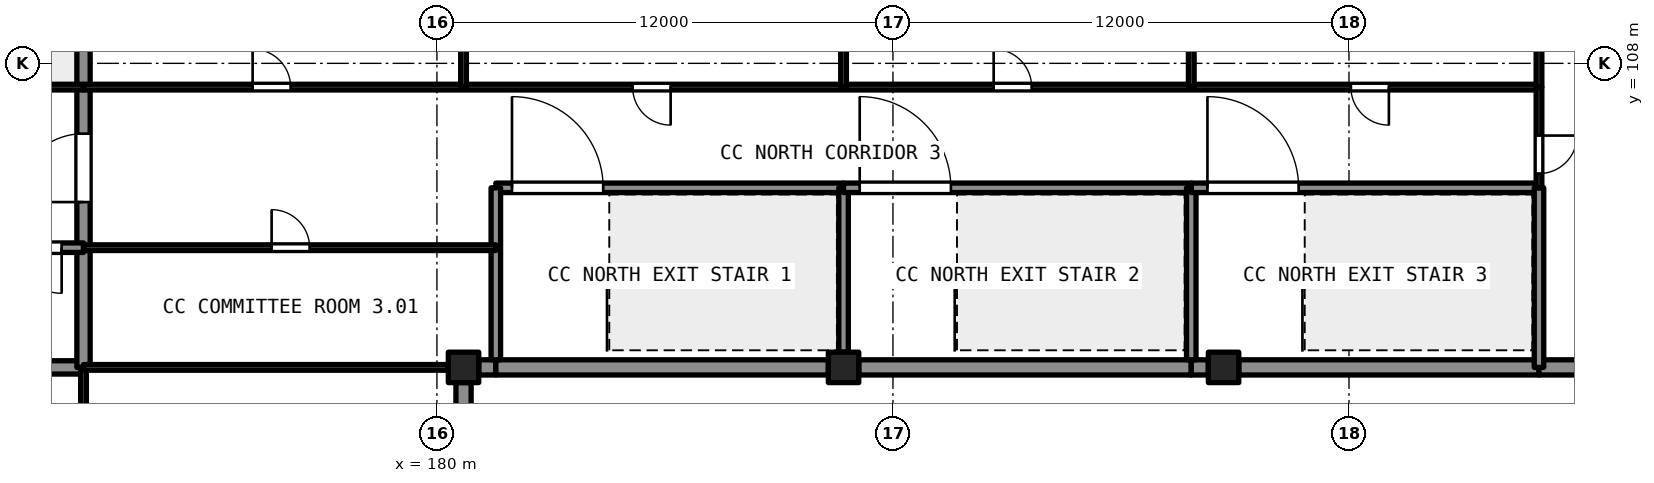
"""IFC4 building model, lengths in metres.
Left out: names, types, materials, properties, quantities, classifications, styles, units other than length and angle.
Written with IfcOpenShell. Run it as: python <this file> out.ifc"""

import sys

from ifc_helpers import new_model, si_unit, direction, frame, frame_2d, origin, origin_2d, place, context, subcontext, project, spatial, rectangle, extrude, element, fill, save


model = new_model("IFC4")
c1 = context("Model", 3, precision=1e-05, world=origin(), true_north=direction((0.0, 1.0)))
c2 = subcontext(c1, "Body", "Model", "MODEL_VIEW")
j1 = project(units=[si_unit("LENGTHUNIT", "METRE"), si_unit("PLANEANGLEUNIT", "RADIAN")], contexts=[c1])
p1 = place(None, origin())
s1 = spatial("IfcSite", under=j1, at=p1, CompositionType="ELEMENT")
p2 = place(p1, origin())
s2 = spatial("IfcBuilding", under=s1, at=p2, CompositionType="ELEMENT")
p3 = place(p2, frame((0.0, 0.0, 20.4)))
s3 = spatial("IfcBuildingStorey", under=s2, at=p3, CompositionType="ELEMENT", Elevation=20.4)
for number, where, z_axis, x_axis in (
    (1, (180.7, 100.0, 0.0), (0.0, 0.0, 1.0), (1.0, 0.0, 0.0)),
    (2, (190.7, 100.0, 0.0), (0.0, 0.0, 1.0), (1.0, 0.0, 0.0)),
    (3, (200.7, 100.0, 0.0), (0.0, 0.0, 1.0), (1.0, 0.0, 0.0)),
):
    element("IfcColumn", number, at=place(p3, frame(where, z_axis=z_axis, x_axis=x_axis)), inside=s3, PredefinedType="COLUMN", context=c2, shape_type="SweptSolid", body=[
        extrude(rectangle(XDim=0.8, YDim=0.8, at=origin_2d()), origin(), (0.0, 0.0, 1.0), 4.59),
    ])
p4 = place(p3, frame((180.7, 60.4, 0.0), z_axis=(0.0, 0.0, 1.0), x_axis=(0.0, 1.0, 0.0)))
e4 = element("IfcWall", 4, at=p4, inside=s3, PredefinedType="SHEAR", context=c2, shape_type="SweptSolid", body=[
    extrude(rectangle(XDim=39.2, YDim=0.4, at=frame_2d((19.6, 0.0))), origin(), (0.0, 0.0, 1.0), 4.59),
])
p5 = place(p3, frame((181.1, 100.0, 0.0), z_axis=(0.0, 0.0, 1.0), x_axis=(1.0, 0.0, 0.0)))
e5 = element("IfcWall", 5, at=p5, inside=s3, PredefinedType="SHEAR", context=c2, shape_type="SweptSolid", body=[
    extrude(rectangle(XDim=0.45, YDim=0.4, at=frame_2d((0.225, 0.0))), origin(), (0.0, 0.0, 1.0), 4.59),
])
for number, where, z_axis, x_axis in (
    (6, (181.55, 100.0, 0.0), (0.0, 0.0, 1.0), (1.0, 0.0, 0.0)),
    (7, (191.1, 100.0, 0.0), (0.0, 0.0, 1.0), (1.0, 0.0, 0.0)),
):
    element("IfcWall", number, at=place(p3, frame(where, z_axis=z_axis, x_axis=x_axis)), inside=s3, PredefinedType="SHEAR", context=c2, shape_type="SweptSolid", body=[
        extrude(rectangle(XDim=8.75, YDim=0.4, at=frame_2d((4.375, 0.0))), origin(), (0.0, 0.0, 1.0), 4.59),
    ])
p6 = place(p3, frame((199.85, 100.0, 0.0), z_axis=(0.0, 0.0, 1.0), x_axis=(1.0, 0.0, 0.0)))
e8 = element("IfcWall", 8, at=p6, inside=s3, PredefinedType="SHEAR", context=c2, shape_type="SweptSolid", body=[
    extrude(rectangle(XDim=0.45, YDim=0.4, at=frame_2d((0.225, 0.0))), origin(), (0.0, 0.0, 1.0), 4.59),
])
p7 = place(p3, frame((201.1, 100.0, 0.0), z_axis=(0.0, 0.0, 1.0), x_axis=(1.0, 0.0, 0.0)))
e9 = element("IfcWall", 9, at=p7, inside=s3, PredefinedType="SHEAR", context=c2, shape_type="SweptSolid", body=[
    extrude(rectangle(XDim=7.9, YDim=0.4, at=frame_2d((3.95, 0.0))), origin(), (0.0, 0.0, 1.0), 4.59),
])
p8 = place(p3, frame((209.0, 100.0, 0.0), z_axis=(0.0, 0.0, 1.0), x_axis=(1.0, 0.0, 0.0)))
e10 = element("IfcWall", 10, at=p8, inside=s3, PredefinedType="SHEAR", context=c2, shape_type="SweptSolid", body=[
    extrude(rectangle(XDim=1.3, YDim=0.4, at=frame_2d((0.65, 0.0))), origin(), (0.0, 0.0, 1.0), 4.59),
])
p9 = place(p3, frame((163.0, 100.0, 0.0), z_axis=(0.0, 0.0, 1.0), x_axis=(1.0, 0.0, 0.0)))
e11 = element("IfcWall", 11, at=p9, inside=s3, PredefinedType="SHEAR", context=c2, shape_type="SweptSolid", body=[
    extrude(rectangle(XDim=7.7, YDim=0.35, at=frame_2d((3.85, 0.0))), origin(), (0.0, 0.0, 1.0), 4.59),
])
p10 = place(p3, frame((170.7, 100.0, 0.0), z_axis=(0.0, 0.0, 1.0), x_axis=(0.0, 1.0, 0.0)))
e12 = element("IfcWall", 12, at=p10, inside=s3, PredefinedType="SHEAR", context=c2, shape_type="SweptSolid", body=[
    extrude(rectangle(XDim=3.15, YDim=0.35, at=frame_2d((1.575, 0.0))), origin(), (0.0, 0.0, 1.0), 4.59),
])
p11 = place(p3, frame((170.7, 103.15, 0.0), z_axis=(0.0, 0.0, 1.0), x_axis=(0.0, 1.0, 0.0)))
e13 = element("IfcWall", 13, at=p11, inside=s3, PredefinedType="SHEAR", context=c2, shape_type="SweptSolid", body=[
    extrude(rectangle(XDim=7.25, YDim=0.35, at=frame_2d((3.625, 0.0))), origin(), (0.0, 0.0, 1.0), 4.59),
])
p12 = place(p11, frame((1.2, 0.0, 0.0)))
e14 = element("IfcOpeningElement", 14, at=p12, cuts=e13, PredefinedType="OPENING", context=c2, shape_type="SweptSolid", body=[
    extrude(rectangle(XDim=1.8, YDim=2.1, at=frame_2d((0.9, 1.05))), frame((0.0, 0.186, 0.0), z_axis=(0.0, -1.0, 0.0), x_axis=(1.0, 0.0, 0.0)), (0.0, 0.0, 1.0), 0.371),
])
p13 = place(p3, frame((163.0, 103.15, 0.0), z_axis=(0.0, 0.0, 1.0), x_axis=(1.0, 0.0, 0.0)))
e15 = element("IfcWall", 15, at=p13, inside=s3, PredefinedType="SHEAR", context=c2, shape_type="SweptSolid", body=[
    extrude(rectangle(XDim=7.7, YDim=0.25, at=frame_2d((3.85, 0.0))), origin(), (0.0, 0.0, 1.0), 4.59),
])
p14 = place(p13, frame((5.925, 0.0, 0.0)))
e16 = element("IfcOpeningElement", 16, at=p14, cuts=e15, PredefinedType="OPENING", context=c2, shape_type="SweptSolid", body=[
    extrude(rectangle(XDim=1.2, YDim=2.1, at=frame_2d((0.6, 1.05))), frame((0.0, 0.135, 0.0), z_axis=(0.0, -1.0, 0.0), x_axis=(1.0, 0.0, 0.0)), (0.0, 0.0, 1.0), 0.271),
])
p15 = place(p3, frame((163.875, 107.375, 0.0), z_axis=(0.0, 0.0, 1.0), x_axis=(1.0, 0.0, 0.0)))
e17 = element("IfcWall", 17, at=p15, inside=s3, PredefinedType="PARTITIONING", context=c2, shape_type="SweptSolid", body=[
    extrude(rectangle(XDim=6.825, YDim=0.15, at=frame_2d((3.413, 0.0))), origin(), (0.0, 0.0, 1.0), 4.59),
])
p16 = place(p15, frame((2.95, 0.0, 0.0)))
e18 = element("IfcOpeningElement", 18, at=p16, cuts=e17, PredefinedType="OPENING", context=c2, shape_type="SweptSolid", body=[
    extrude(rectangle(XDim=0.9, YDim=2.1, at=frame_2d((0.45, 1.05))), frame((0.0, 0.085, 0.0), z_axis=(0.0, -1.0, 0.0), x_axis=(1.0, 0.0, 0.0)), (0.0, 0.0, 1.0), 0.171),
])
p17 = place(p3, frame((170.7, 90.0, 0.0), z_axis=(0.0, 0.0, 1.0), x_axis=(0.0, 1.0, 0.0)))
e19 = element("IfcWall", 19, at=p17, inside=s3, PredefinedType="PARTITIONING", context=c2, shape_type="SweptSolid", body=[
    extrude(rectangle(XDim=10.0, YDim=0.15, at=frame_2d((5.0, 0.0))), origin(), (0.0, 0.0, 1.0), 4.59),
])
p18 = place(p3, frame((170.7, 100.0, 0.0), z_axis=(0.0, 0.0, 1.0), x_axis=(1.0, 0.0, 0.0)))
e20 = element("IfcWall", 20, at=p18, inside=s3, PredefinedType="PARTITIONING", context=c2, shape_type="SweptSolid", body=[
    extrude(rectangle(XDim=9.6, YDim=0.15, at=frame_2d((4.8, 0.0))), origin(), (0.0, 0.0, 1.0), 4.59),
])
p19 = place(p3, frame((181.55, 104.725, 0.0), z_axis=(0.0, 0.0, 1.0), x_axis=(1.0, 0.0, 0.0)))
e21 = element("IfcWall", 21, at=p19, inside=s3, PredefinedType="SHEAR", context=c2, shape_type="SweptSolid", body=[
    extrude(rectangle(XDim=9.15, YDim=0.25, at=frame_2d((4.575, 0.0))), origin(), (0.0, 0.0, 1.0), 4.59),
])
p20 = place(p19, frame((0.425, 0.0, 0.0)))
e22 = element("IfcOpeningElement", 22, at=p20, cuts=e21, PredefinedType="OPENING", context=c2, shape_type="SweptSolid", body=[
    extrude(rectangle(XDim=2.4, YDim=2.1, at=frame_2d((1.2, 1.05))), frame((0.0, 0.135, 0.0), z_axis=(0.0, -1.0, 0.0), x_axis=(1.0, 0.0, 0.0)), (0.0, 0.0, 1.0), 0.271),
])
p21 = place(p3, frame((181.55, 100.2, 0.0), z_axis=(0.0, 0.0, 1.0), x_axis=(0.0, 1.0, 0.0)))
e23 = element("IfcWall", 23, at=p21, inside=s3, PredefinedType="SHEAR", context=c2, shape_type="SweptSolid", body=[
    extrude(rectangle(XDim=4.525, YDim=0.25, at=frame_2d((2.263, 0.0))), origin(), (0.0, 0.0, 1.0), 4.59),
])
p22 = place(p3, frame((190.7, 100.4, 0.0), z_axis=(0.0, 0.0, 1.0), x_axis=(0.0, 1.0, 0.0)))
e24 = element("IfcWall", 24, at=p22, inside=s3, PredefinedType="SHEAR", context=c2, shape_type="SweptSolid", body=[
    extrude(rectangle(XDim=4.325, YDim=0.25, at=frame_2d((2.163, 0.0))), origin(), (0.0, 0.0, 1.0), 4.59),
])
p23 = place(p3, frame((190.7, 104.725, 0.0), z_axis=(0.0, 0.0, 1.0), x_axis=(1.0, 0.0, 0.0)))
e25 = element("IfcWall", 25, at=p23, inside=s3, PredefinedType="SHEAR", context=c2, shape_type="SweptSolid", body=[
    extrude(rectangle(XDim=9.15, YDim=0.25, at=frame_2d((4.575, 0.0))), origin(), (0.0, 0.0, 1.0), 4.59),
])
p24 = place(p23, frame((0.425, 0.0, 0.0)))
e26 = element("IfcOpeningElement", 26, at=p24, cuts=e25, PredefinedType="OPENING", context=c2, shape_type="SweptSolid", body=[
    extrude(rectangle(XDim=2.4, YDim=2.1, at=frame_2d((1.2, 1.05))), frame((0.0, 0.135, 0.0), z_axis=(0.0, -1.0, 0.0), x_axis=(1.0, 0.0, 0.0)), (0.0, 0.0, 1.0), 0.271),
])
p25 = place(p3, frame((199.85, 100.2, 0.0), z_axis=(0.0, 0.0, 1.0), x_axis=(0.0, 1.0, 0.0)))
e27 = element("IfcWall", 27, at=p25, inside=s3, PredefinedType="SHEAR", context=c2, shape_type="SweptSolid", body=[
    extrude(rectangle(XDim=4.525, YDim=0.25, at=frame_2d((2.263, 0.0))), origin(), (0.0, 0.0, 1.0), 4.59),
])
p26 = place(p3, frame((199.85, 104.725, 0.0), z_axis=(0.0, 0.0, 1.0), x_axis=(1.0, 0.0, 0.0)))
e28 = element("IfcWall", 28, at=p26, inside=s3, PredefinedType="SHEAR", context=c2, shape_type="SweptSolid", body=[
    extrude(rectangle(XDim=9.15, YDim=0.25, at=frame_2d((4.575, 0.0))), origin(), (0.0, 0.0, 1.0), 4.59),
])
p27 = place(p26, frame((0.425, 0.0, 0.0)))
e29 = element("IfcOpeningElement", 29, at=p27, cuts=e28, PredefinedType="OPENING", context=c2, shape_type="SweptSolid", body=[
    extrude(rectangle(XDim=2.4, YDim=2.1, at=frame_2d((1.2, 1.05))), frame((0.0, 0.135, 0.0), z_axis=(0.0, -1.0, 0.0), x_axis=(1.0, 0.0, 0.0)), (0.0, 0.0, 1.0), 0.271),
])
p28 = place(p3, frame((209.0, 100.0, 0.0), z_axis=(0.0, 0.0, 1.0), x_axis=(0.0, 1.0, 0.0)))
e30 = element("IfcWall", 30, at=p28, inside=s3, PredefinedType="SHEAR", context=c2, shape_type="SweptSolid", body=[
    extrude(rectangle(XDim=4.725, YDim=0.25, at=frame_2d((2.363, 0.0))), origin(), (0.0, 0.0, 1.0), 4.59),
])
p29 = place(p3, frame((170.7, 103.15, 0.0), z_axis=(0.0, 0.0, 1.0), x_axis=(1.0, 0.0, 0.0)))
e31 = element("IfcWall", 31, at=p29, inside=s3, PredefinedType="PARTITIONING", context=c2, shape_type="SweptSolid", body=[
    extrude(rectangle(XDim=10.85, YDim=0.15, at=frame_2d((5.425, 0.0))), origin(), (0.0, 0.0, 1.0), 4.59),
])
p30 = place(p29, frame((4.95, 0.0, 0.0)))
e32 = element("IfcOpeningElement", 32, at=p30, cuts=e31, PredefinedType="OPENING", context=c2, shape_type="SweptSolid", body=[
    extrude(rectangle(XDim=1.0, YDim=2.1, at=frame_2d((0.5, 1.05))), frame((0.0, 0.085, 0.0), z_axis=(0.0, -1.0, 0.0), x_axis=(1.0, 0.0, 0.0)), (0.0, 0.0, 1.0), 0.171),
])
p31 = place(p3, frame((209.0, 107.375, 0.0), z_axis=(0.0, 0.0, 1.0), x_axis=(-1.0, 0.0, 0.0)))
e33 = element("IfcWall", 33, at=p31, inside=s3, PredefinedType="PARTITIONING", context=c2, shape_type="SweptSolid", body=[
    extrude(rectangle(XDim=38.3, YDim=0.15, at=frame_2d((19.15, 0.0))), origin(), (0.0, 0.0, 1.0), 4.59),
])
p32 = place(p31, frame((32.85, 0.0, 0.0)))
e34 = element("IfcOpeningElement", 34, at=p32, cuts=e33, PredefinedType="OPENING", context=c2, shape_type="SweptSolid", body=[
    extrude(rectangle(XDim=1.0, YDim=2.1, at=frame_2d((0.5, 1.05))), frame((0.0, 0.085, 0.0), z_axis=(0.0, -1.0, 0.0), x_axis=(1.0, 0.0, 0.0)), (0.0, 0.0, 1.0), 0.171),
])
p33 = place(p31, frame((22.85, 0.0, 0.0)))
e35 = element("IfcOpeningElement", 35, at=p33, cuts=e33, PredefinedType="OPENING", context=c2, shape_type="SweptSolid", body=[
    extrude(rectangle(XDim=1.0, YDim=2.1, at=frame_2d((0.5, 1.05))), frame((0.0, 0.085, 0.0), z_axis=(0.0, -1.0, 0.0), x_axis=(1.0, 0.0, 0.0)), (0.0, 0.0, 1.0), 0.171),
])
p34 = place(p31, frame((13.35, 0.0, 0.0)))
e36 = element("IfcOpeningElement", 36, at=p34, cuts=e33, PredefinedType="OPENING", context=c2, shape_type="SweptSolid", body=[
    extrude(rectangle(XDim=1.0, YDim=2.1, at=frame_2d((0.5, 1.05))), frame((0.0, 0.085, 0.0), z_axis=(0.0, -1.0, 0.0), x_axis=(1.0, 0.0, 0.0)), (0.0, 0.0, 1.0), 0.171),
])
p35 = place(p31, frame((3.95, 0.0, 0.0)))
e37 = element("IfcOpeningElement", 37, at=p35, cuts=e33, PredefinedType="OPENING", context=c2, shape_type="SweptSolid", body=[
    extrude(rectangle(XDim=1.0, YDim=2.1, at=frame_2d((0.5, 1.05))), frame((0.0, 0.085, 0.0), z_axis=(0.0, -1.0, 0.0), x_axis=(1.0, 0.0, 0.0)), (0.0, 0.0, 1.0), 0.171),
])
p36 = place(p3, frame((209.0, 104.725, 0.0), z_axis=(0.0, 0.0, 1.0), x_axis=(0.0, 1.0, 0.0)))
e38 = element("IfcWall", 38, at=p36, inside=s3, PredefinedType="PARTITIONING", context=c2, shape_type="SweptSolid", body=[
    extrude(rectangle(XDim=2.65, YDim=0.15, at=frame_2d((1.325, 0.0))), origin(), (0.0, 0.0, 1.0), 4.59),
])
p37 = place(p36, frame((0.375, 0.0, 0.0)))
e39 = element("IfcOpeningElement", 39, at=p37, cuts=e38, PredefinedType="OPENING", context=c2, shape_type="SweptSolid", body=[
    extrude(rectangle(XDim=1.0, YDim=2.1, at=frame_2d((0.5, 1.05))), frame((0.0, 0.085, 0.0), z_axis=(0.0, -1.0, 0.0), x_axis=(1.0, 0.0, 0.0)), (0.0, 0.0, 1.0), 0.171),
])
for number, where, z_axis, x_axis in (
    (40, (180.7, 107.375, 0.0), (0.0, 0.0, 1.0), (0.0, 1.0, 0.0)),
    (41, (190.7, 107.375, 0.0), (0.0, 0.0, 1.0), (0.0, 1.0, 0.0)),
):
    element("IfcWall", number, at=place(p3, frame(where, z_axis=z_axis, x_axis=x_axis)), inside=s3, PredefinedType="PARTITIONING", context=c2, shape_type="SweptSolid", body=[
        extrude(rectangle(XDim=2.225, YDim=0.15, at=frame_2d((1.113, 0.0))), origin(), (0.0, 0.0, 1.0), 4.59),
    ])
for number, where, z_axis, x_axis in (
    (42, (199.85, 107.375, 0.0), (0.0, 0.0, 1.0), (0.0, 1.0, 0.0)),
    (43, (209.0, 107.375, 0.0), (0.0, 0.0, 1.0), (0.0, 1.0, 0.0)),
):
    element("IfcWall", number, at=place(p3, frame(where, z_axis=z_axis, x_axis=x_axis)), inside=s3, PredefinedType="PARTITIONING", context=c2, shape_type="SweptSolid", body=[
        extrude(rectangle(XDim=3.025, YDim=0.15, at=frame_2d((1.512, 0.0))), origin(), (0.0, 0.0, 1.0), 4.59),
    ])
p38 = place(p12, origin())
e44 = element("IfcDoor", 44, at=p38, inside=s3, OperationType="DOUBLE_DOOR_SINGLE_SWING", PredefinedType="DOOR", context=c2, shape_type="SweptSolid", body=[
    extrude(rectangle(XDim=1.8, YDim=2.1, at=frame_2d((0.9, 1.05))), frame((0.0, 0.025, 0.0), z_axis=(0.0, -1.0, 0.0), x_axis=(1.0, 0.0, 0.0)), (0.0, 0.0, 1.0), 0.05),
])
fill(e14, e44)
p39 = place(p30, origin())
e45 = element("IfcDoor", 45, at=p39, inside=s3, OperationType="SINGLE_SWING_LEFT", PredefinedType="DOOR", context=c2, shape_type="SweptSolid", body=[
    extrude(rectangle(XDim=1.0, YDim=2.1, at=frame_2d((0.5, 1.05))), frame((0.0, 0.025, 0.0), z_axis=(0.0, -1.0, 0.0), x_axis=(1.0, 0.0, 0.0)), (0.0, 0.0, 1.0), 0.05),
])
fill(e32, e45)
p40 = place(p32, origin())
e46 = element("IfcDoor", 46, at=p40, inside=s3, OperationType="SINGLE_SWING_RIGHT", PredefinedType="DOOR", context=c2, shape_type="SweptSolid", body=[
    extrude(rectangle(XDim=1.0, YDim=2.1, at=frame_2d((0.5, 1.05))), frame((0.0, 0.025, 0.0), z_axis=(0.0, -1.0, 0.0), x_axis=(1.0, 0.0, 0.0)), (0.0, 0.0, 1.0), 0.05),
])
fill(e34, e46)
p41 = place(p33, origin())
e47 = element("IfcDoor", 47, at=p41, inside=s3, OperationType="SINGLE_SWING_LEFT", PredefinedType="DOOR", context=c2, shape_type="SweptSolid", body=[
    extrude(rectangle(XDim=1.0, YDim=2.1, at=frame_2d((0.5, 1.05))), frame((0.0, 0.025, 0.0), z_axis=(0.0, -1.0, 0.0), x_axis=(1.0, 0.0, 0.0)), (0.0, 0.0, 1.0), 0.05),
])
fill(e35, e47)
p42 = place(p34, origin())
e48 = element("IfcDoor", 48, at=p42, inside=s3, OperationType="SINGLE_SWING_RIGHT", PredefinedType="DOOR", context=c2, shape_type="SweptSolid", body=[
    extrude(rectangle(XDim=1.0, YDim=2.1, at=frame_2d((0.5, 1.05))), frame((0.0, 0.025, 0.0), z_axis=(0.0, -1.0, 0.0), x_axis=(1.0, 0.0, 0.0)), (0.0, 0.0, 1.0), 0.05),
])
fill(e36, e48)
p43 = place(p35, origin())
e49 = element("IfcDoor", 49, at=p43, inside=s3, OperationType="SINGLE_SWING_LEFT", PredefinedType="DOOR", context=c2, shape_type="SweptSolid", body=[
    extrude(rectangle(XDim=1.0, YDim=2.1, at=frame_2d((0.5, 1.05))), frame((0.0, 0.025, 0.0), z_axis=(0.0, -1.0, 0.0), x_axis=(1.0, 0.0, 0.0)), (0.0, 0.0, 1.0), 0.05),
])
fill(e37, e49)
p44 = place(p37, origin())
e50 = element("IfcDoor", 50, at=p44, inside=s3, OperationType="SINGLE_SWING_RIGHT", PredefinedType="DOOR", context=c2, shape_type="SweptSolid", body=[
    extrude(rectangle(XDim=1.0, YDim=2.1, at=frame_2d((0.5, 1.05))), frame((0.0, 0.025, 0.0), z_axis=(0.0, -1.0, 0.0), x_axis=(1.0, 0.0, 0.0)), (0.0, 0.0, 1.0), 0.05),
])
fill(e39, e50)
p45 = place(p14, origin())
e51 = element("IfcDoor", 51, at=p45, inside=s3, OperationType="SINGLE_SWING_RIGHT", PredefinedType="DOOR", context=c2, shape_type="SweptSolid", body=[
    extrude(rectangle(XDim=1.2, YDim=2.1, at=frame_2d((0.6, 1.05))), frame((0.0, 0.025, 0.0), z_axis=(0.0, -1.0, 0.0), x_axis=(1.0, 0.0, 0.0)), (0.0, 0.0, 1.0), 0.05),
])
fill(e16, e51)
p46 = place(p20, origin())
e52 = element("IfcDoor", 52, at=p46, inside=s3, OperationType="DOUBLE_DOOR_SINGLE_SWING", PredefinedType="DOOR", context=c2, shape_type="SweptSolid", body=[
    extrude(rectangle(XDim=2.4, YDim=2.1, at=frame_2d((1.2, 1.05))), frame((0.0, 0.025, 0.0), z_axis=(0.0, -1.0, 0.0), x_axis=(1.0, 0.0, 0.0)), (0.0, 0.0, 1.0), 0.05),
])
fill(e22, e52)
p47 = place(p24, origin())
e53 = element("IfcDoor", 53, at=p47, inside=s3, OperationType="DOUBLE_DOOR_SINGLE_SWING", PredefinedType="DOOR", context=c2, shape_type="SweptSolid", body=[
    extrude(rectangle(XDim=2.4, YDim=2.1, at=frame_2d((1.2, 1.05))), frame((0.0, 0.025, 0.0), z_axis=(0.0, -1.0, 0.0), x_axis=(1.0, 0.0, 0.0)), (0.0, 0.0, 1.0), 0.05),
])
fill(e26, e53)
p48 = place(p27, origin())
e54 = element("IfcDoor", 54, at=p48, inside=s3, OperationType="DOUBLE_DOOR_SINGLE_SWING", PredefinedType="DOOR", context=c2, shape_type="SweptSolid", body=[
    extrude(rectangle(XDim=2.4, YDim=2.1, at=frame_2d((1.2, 1.05))), frame((0.0, 0.025, 0.0), z_axis=(0.0, -1.0, 0.0), x_axis=(1.0, 0.0, 0.0)), (0.0, 0.0, 1.0), 0.05),
])
fill(e29, e54)
save(model, sys.argv[1])
